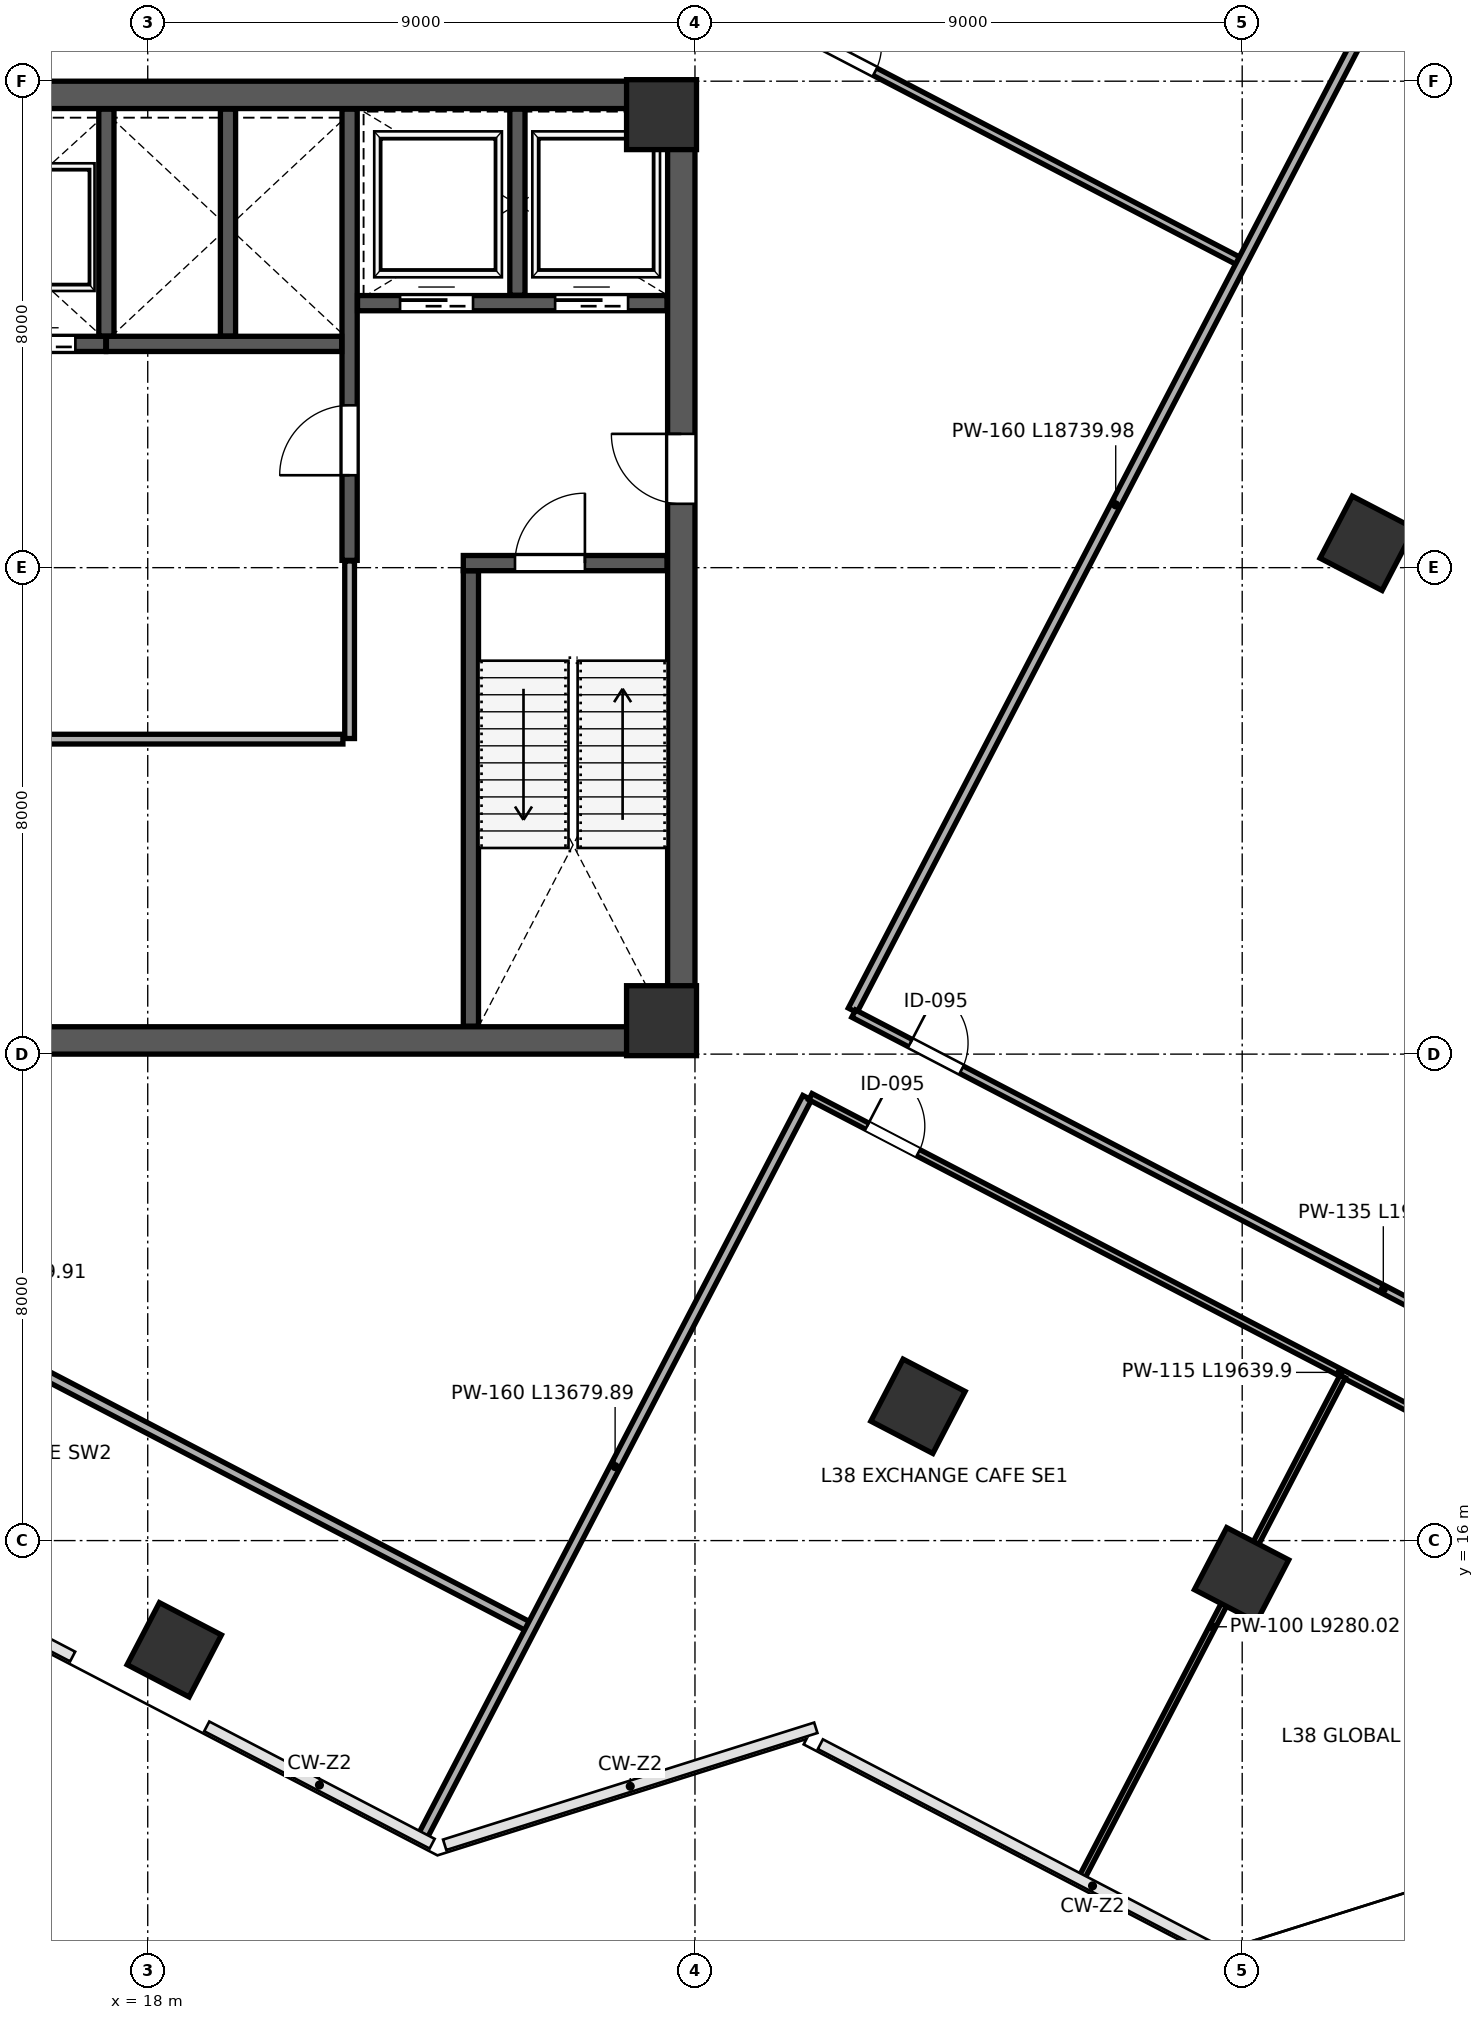
"""IFC4 building model, lengths in metres.
Left out: names, types, materials, properties, quantities, classifications, styles, units other than length and angle.
Written with IfcOpenShell. Run it as: python <this file> out.ifc"""

import sys

from ifc_helpers import new_model, si_unit, direction, frame, frame_2d, origin, origin_2d, place, context, subcontext, project, spatial, rectangle, extrude, clip, halfspace, source, transform, mapped, element, fill, save


model = new_model("IFC4")
c1 = context("Model", 3, precision=1e-05, world=origin(), true_north=direction((0.0, 1.0)))
c2 = subcontext(c1, "Body", "Model", "MODEL_VIEW")
j1 = project(units=[si_unit("LENGTHUNIT", "METRE"), si_unit("PLANEANGLEUNIT", "RADIAN")], contexts=[c1])
p1 = place(None, origin())
s1 = spatial("IfcSite", under=j1, at=p1, CompositionType="ELEMENT")
p2 = place(p1, origin())
s2 = spatial("IfcBuilding", under=s1, at=p2, CompositionType="ELEMENT")
p3 = place(p2, frame((0.0, 0.0, 170.8)))
s3 = spatial("IfcBuildingStorey", under=s2, at=p3, CompositionType="ELEMENT", Elevation=170.8)
m1 = source(origin(), c2, "Body", "SweptSolid", [
    extrude(rectangle(XDim=1.15, YDim=1.15, at=origin_2d()), origin(), (0.0, 0.0, 1.0), 4.198),
])
for number, where, z_axis, x_axis in (
    (1, (26.45, 24.55, 0.001), (0.0, 0.0, 1.0), (1.0, 0.0, 0.0)),
    (2, (26.45, 39.45, 0.001), (0.0, 0.0, 1.0), (1.0, 0.0, 0.0)),
):
    element("IfcColumn", number, at=place(p3, frame(where, z_axis=z_axis, x_axis=x_axis)), inside=s3, PredefinedType="COLUMN", context=c2, shape_type="MappedRepresentation", body=[
        mapped(m1, transform((0.0, 0.0, 0.0), scale=1.0)),
    ])
p4 = place(p3, frame((18.437, 14.204, 0.0), z_axis=(-0.091848266599, 0.016841742647, 0.995630579898), x_axis=(0.612171305094, 0.789548693959, 0.043117897532)))
e3 = element("IfcColumn", 3, at=p4, inside=s3, PredefinedType="COLUMN", context=c2, shape_type="Clipping", body=[
    clip(clip(extrude(rectangle(XDim=1.15, YDim=1.15, at=origin_2d()), origin(), (0.0, 0.0, 1.0), 4.218), halfspace(frame((0.0, 0.0, 0.073), z_axis=(0.0, 0.0, -1.0), x_axis=(1.0, 0.0, 0.0)), False)), halfspace(frame((0.0, 0.0, 4.145), z_axis=(0.0, 0.0, 1.0), x_axis=(1.0, 0.0, 0.0)), False)),
])
p5 = place(p3, frame((30.668, 18.208, 0.0), z_axis=(-0.071930787685, -0.046679722121, 0.996316699311), x_axis=(-0.096954290528, 0.99450093611, 0.039594868666)))
e4 = element("IfcColumn", 4, at=p5, inside=s3, PredefinedType="COLUMN", context=c2, shape_type="Clipping", body=[
    clip(clip(extrude(rectangle(XDim=1.15, YDim=1.15, at=origin_2d()), origin(), (0.0, 0.0, 1.0), 4.216), halfspace(frame((0.0, 0.0, 0.067), z_axis=(0.0, 0.0, -1.0), x_axis=(1.0, 0.0, 0.0)), False)), halfspace(frame((0.0, 0.0, 4.148), z_axis=(0.0, 0.0, 1.0), x_axis=(1.0, 0.0, 0.0)), False)),
])
p6 = place(p3, frame((38.056, 32.401, 0.0), z_axis=(0.001100398588, -0.085657342736, 0.996324048068), x_axis=(-0.892847218174, 0.44861923, 0.039555422793)))
e5 = element("IfcColumn", 5, at=p6, inside=s3, PredefinedType="COLUMN", context=c2, shape_type="Clipping", body=[
    clip(clip(extrude(rectangle(XDim=1.15, YDim=1.15, at=origin_2d()), origin(), (0.0, 0.0, 1.0), 4.215), halfspace(frame((0.0, 0.0, 0.067), z_axis=(0.0, 0.0, -1.0), x_axis=(1.0, 0.0, 0.0)), False)), halfspace(frame((0.0, 0.0, 4.148), z_axis=(0.0, 0.0, 1.0), x_axis=(1.0, 0.0, 0.0)), False)),
])
p7 = place(p3, frame((35.99, 15.438, 0.0), z_axis=(-0.086283669312, -0.073808921942, 0.993532773215), x_axis=(-0.227975249338, 0.972254300779, 0.052429574719)))
e6 = element("IfcColumn", 6, at=p7, inside=s3, PredefinedType="COLUMN", context=c2, shape_type="Clipping", body=[
    clip(clip(extrude(rectangle(XDim=1.15, YDim=1.15, at=origin_2d()), origin(), (0.0, 0.0, 1.0), 4.227), halfspace(frame((0.0, 0.0, 0.089), z_axis=(0.0, 0.0, -1.0), x_axis=(1.0, 0.0, 0.0)), False)), halfspace(frame((0.0, 0.0, 4.138), z_axis=(0.0, 0.0, 1.0), x_axis=(1.0, 0.0, 0.0)), False)),
])
p8 = place(p3, frame((26.775, 24.45, 0.0), z_axis=(0.0, 0.0, 1.0), x_axis=(0.0, 1.0, 0.0)))
e7 = element("IfcWall", 7, at=p8, inside=s3, PredefinedType="SHEAR", context=c2, shape_type="SweptSolid", body=[
    extrude(rectangle(XDim=15.1, YDim=0.45, at=frame_2d((7.55, 0.0))), origin(), (0.0, 0.0, 1.0), 3.96),
])
p9 = place(p8, frame((8.6, 0.0, 0.0)))
e8 = element("IfcOpeningElement", 8, at=p9, cuts=e7, PredefinedType="OPENING", context=c2, shape_type="SweptSolid", body=[
    extrude(rectangle(XDim=1.15, YDim=2.2, at=frame_2d((0.575, 1.1))), frame((0.0, 0.235, 0.0), z_axis=(0.0, -1.0, 0.0), x_axis=(1.0, 0.0, 0.0)), (0.0, 0.0, 1.0), 0.47),
])
for number, where, z_axis, x_axis in (
    (9, (9.0, 24.225, 0.0), (0.0, 0.0, 1.0), (1.0, 0.0, 0.0)),
    (10, (9.0, 39.775, 0.0), (0.0, 0.0, 1.0), (1.0, 0.0, 0.0)),
):
    element("IfcWall", number, at=place(p3, frame(where, z_axis=z_axis, x_axis=x_axis)), inside=s3, PredefinedType="SHEAR", context=c2, shape_type="SweptSolid", body=[
        extrude(rectangle(XDim=18.0, YDim=0.45, at=frame_2d((9.0, 0.0))), origin(), (0.0, 0.0, 1.0), 3.96),
    ])
p10 = place(p3, frame((23.315, 24.46, 0.0), z_axis=(0.0, 0.0, 1.0), x_axis=(0.0, 1.0, 0.0)))
e11 = element("IfcWall", 11, at=p10, inside=s3, PredefinedType="SHEAR", context=c2, shape_type="SweptSolid", body=[
    extrude(rectangle(XDim=7.49, YDim=0.25, at=frame_2d((3.745, 0.0))), origin(), (0.0, 0.0, 1.0), 3.96),
])
p11 = place(p3, frame((23.19, 32.075, 0.0), z_axis=(0.0, 0.0, 1.0), x_axis=(1.0, 0.0, 0.0)))
e12 = element("IfcWall", 12, at=p11, inside=s3, PredefinedType="SHEAR", context=c2, shape_type="SweptSolid", body=[
    extrude(rectangle(XDim=3.35, YDim=0.25, at=frame_2d((1.675, 0.0))), origin(), (0.0, 0.0, 1.0), 3.96),
])
p12 = place(p11, frame((0.85, 0.0, 0.0)))
e13 = element("IfcOpeningElement", 13, at=p12, cuts=e12, PredefinedType="OPENING", context=c2, shape_type="SweptSolid", body=[
    extrude(rectangle(XDim=1.15, YDim=2.2, at=frame_2d((0.575, 1.1))), frame((0.0, 0.135, 0.0), z_axis=(0.0, -1.0, 0.0), x_axis=(1.0, 0.0, 0.0)), (0.0, 0.0, 1.0), 0.27),
])
p13 = place(p3, frame((21.32, 32.12, 0.0), z_axis=(0.0, 0.0, 1.0), x_axis=(0.0, 1.0, 0.0)))
e14 = element("IfcWall", 14, at=p13, inside=s3, PredefinedType="SHEAR", context=c2, shape_type="SweptSolid", body=[
    extrude(rectangle(XDim=7.42, YDim=0.25, at=frame_2d((3.71, 0.0))), origin(), (0.0, 0.0, 1.0), 3.96),
])
p14 = place(p13, frame((1.4, 0.0, 0.0)))
e15 = element("IfcOpeningElement", 15, at=p14, cuts=e14, PredefinedType="OPENING", context=c2, shape_type="SweptSolid", body=[
    extrude(rectangle(XDim=1.15, YDim=2.2, at=frame_2d((0.575, 1.1))), frame((0.0, 0.135, 0.0), z_axis=(0.0, -1.0, 0.0), x_axis=(1.0, 0.0, 0.0)), (0.0, 0.0, 1.0), 0.27),
])
p15 = place(p3, frame((21.45, 36.35, 0.0), z_axis=(0.0, 0.0, 1.0), x_axis=(1.0, 0.0, 0.0)))
e16 = element("IfcWall", 16, at=p15, inside=s3, PredefinedType="SHEAR", context=c2, shape_type="SweptSolid", body=[
    extrude(rectangle(XDim=5.09, YDim=0.25, at=frame_2d((2.545, 0.0))), origin(), (0.0, 0.0, 1.0), 3.96),
])
p16 = place(p15, frame((0.7, 0.0, 0.0)))
e17 = element("IfcOpeningElement", 17, at=p16, cuts=e16, PredefinedType="OPENING", context=c2, shape_type="SweptSolid", body=[
    extrude(rectangle(XDim=1.2, YDim=2.2, at=frame_2d((0.6, 1.1))), frame((0.0, 0.135, 0.0), z_axis=(0.0, -1.0, 0.0), x_axis=(1.0, 0.0, 0.0)), (0.0, 0.0, 1.0), 0.27),
])
p17 = place(p15, frame((3.25, 0.0, 0.0)))
e18 = element("IfcOpeningElement", 18, at=p17, cuts=e16, PredefinedType="OPENING", context=c2, shape_type="SweptSolid", body=[
    extrude(rectangle(XDim=1.2, YDim=2.2, at=frame_2d((0.6, 1.1))), frame((0.0, 0.135, 0.0), z_axis=(0.0, -1.0, 0.0), x_axis=(1.0, 0.0, 0.0)), (0.0, 0.0, 1.0), 0.27),
])
p18 = place(p3, frame((24.08, 36.48, 0.0), z_axis=(0.0, 0.0, 1.0), x_axis=(0.0, 1.0, 0.0)))
e19 = element("IfcWall", 19, at=p18, inside=s3, PredefinedType="SHEAR", context=c2, shape_type="SweptSolid", body=[
    extrude(rectangle(XDim=3.06, YDim=0.25, at=frame_2d((1.53, 0.0))), origin(), (0.0, 0.0, 1.0), 3.96),
])
p19 = place(p3, frame((13.06, 35.68, 0.0), z_axis=(0.0, 0.0, 1.0), x_axis=(1.0, 0.0, 0.0)))
e20 = element("IfcWall", 20, at=p19, inside=s3, PredefinedType="SHEAR", context=c2, shape_type="SweptSolid", body=[
    extrude(rectangle(XDim=4.25, YDim=0.25, at=frame_2d((2.125, 0.0))), origin(), (0.0, 0.0, 1.0), 3.96),
])
p20 = place(p19, frame((0.65, 0.0, 0.0)))
e21 = element("IfcOpeningElement", 21, at=p20, cuts=e20, PredefinedType="OPENING", context=c2, shape_type="SweptSolid", body=[
    extrude(rectangle(XDim=1.1, YDim=2.2, at=frame_2d((0.55, 1.1))), frame((0.0, 0.135, 0.0), z_axis=(0.0, -1.0, 0.0), x_axis=(1.0, 0.0, 0.0)), (0.0, 0.0, 1.0), 0.27),
])
p21 = place(p19, frame((2.65, 0.0, 0.0)))
e22 = element("IfcOpeningElement", 22, at=p21, cuts=e20, PredefinedType="OPENING", context=c2, shape_type="SweptSolid", body=[
    extrude(rectangle(XDim=1.1, YDim=2.2, at=frame_2d((0.55, 1.1))), frame((0.0, 0.135, 0.0), z_axis=(0.0, -1.0, 0.0), x_axis=(1.0, 0.0, 0.0)), (0.0, 0.0, 1.0), 0.27),
])
p22 = place(p3, frame((17.32, 35.68, 0.0), z_axis=(0.0, 0.0, 1.0), x_axis=(1.0, 0.0, 0.0)))
e23 = element("IfcWall", 23, at=p22, inside=s3, PredefinedType="SHEAR", context=c2, shape_type="SweptSolid", body=[
    extrude(rectangle(XDim=3.87, YDim=0.25, at=frame_2d((1.935, 0.0))), origin(), (0.0, 0.0, 1.0), 3.96),
])
for number, where, z_axis, x_axis in (
    (24, (17.32, 35.81, 0.0), (0.0, 0.0, 1.0), (0.0, 1.0, 0.0)),
    (25, (19.32, 35.81, 0.0), (0.0, 0.0, 1.0), (0.0, 1.0, 0.0)),
):
    element("IfcWall", number, at=place(p3, frame(where, z_axis=z_axis, x_axis=x_axis)), inside=s3, PredefinedType="SHEAR", context=c2, shape_type="SweptSolid", body=[
        extrude(rectangle(XDim=3.73, YDim=0.25, at=frame_2d((1.865, 0.0))), origin(), (0.0, 0.0, 1.0), 3.96),
    ])
p23 = place(p3, frame((12.84, 29.18, 0.0), z_axis=(0.0, 0.0, 1.0), x_axis=(1.0, 0.0, 0.0)))
e26 = element("IfcWall", 26, at=p23, inside=s3, PredefinedType="PARTITIONING", context=c2, shape_type="SweptSolid", body=[
    extrude(rectangle(XDim=8.37, YDim=0.16, at=frame_2d((4.185, 0.0))), origin(), (0.0, 0.0, 1.0), 3.96),
])
p24 = place(p23, frame((2.6, 0.0, 0.0)))
e27 = element("IfcOpeningElement", 27, at=p24, cuts=e26, PredefinedType="OPENING", context=c2, shape_type="SweptSolid", body=[
    extrude(rectangle(XDim=0.9, YDim=2.15, at=frame_2d((0.45, 1.075))), frame((0.0, 0.09, 0.0), z_axis=(0.0, -1.0, 0.0), x_axis=(1.0, 0.0, 0.0)), (0.0, 0.0, 1.0), 0.18),
])
p25 = place(p3, frame((21.32, 29.19, 0.0), z_axis=(0.0, 0.0, 1.0), x_axis=(0.0, 1.0, 0.0)))
e28 = element("IfcWall", 28, at=p25, inside=s3, PredefinedType="PARTITIONING", context=c2, shape_type="SweptSolid", body=[
    extrude(rectangle(XDim=2.92, YDim=0.16, at=frame_2d((1.46, 0.0))), origin(), (0.0, 0.0, 1.0), 3.96),
])
p26 = place(p3, frame((6.699, 23.73, 0.0), z_axis=(0.0, 0.0, 1.0), x_axis=(0.887009683963, -0.46175082085, 0.0)))
e29 = element("IfcWall", 29, at=p26, inside=s3, PredefinedType="PARTITIONING", context=c2, shape_type="SweptSolid", body=[
    extrude(rectangle(XDim=19.81, YDim=0.16, at=frame_2d((9.905, 0.0))), origin(), (0.0, 0.0, 1.0), 3.96),
])
p27 = place(p26, frame((1.45, 0.0, 0.0)))
e30 = element("IfcOpeningElement", 30, at=p27, cuts=e29, PredefinedType="OPENING", context=c2, shape_type="SweptSolid", body=[
    extrude(rectangle(XDim=0.95, YDim=2.15, at=frame_2d((0.475, 1.075))), frame((0.0, 0.09, 0.0), z_axis=(0.0, -1.0, 0.0), x_axis=(1.0, 0.0, 0.0)), (0.0, 0.0, 1.0), 0.18),
])
p28 = place(p3, frame((11.104, 49.971, 0.0), z_axis=(0.0, 0.0, 1.0), x_axis=(0.887010001249, -0.461750211353, 0.0)))
e31 = element("IfcWall", 31, at=p28, inside=s3, PredefinedType="PARTITIONING", context=c2, shape_type="SweptSolid", body=[
    extrude(rectangle(XDim=28.02, YDim=0.135, at=frame_2d((14.01, 0.0))), origin(), (0.0, 0.0, 1.0), 3.96),
])
p29 = place(p28, frame((20.31, 0.0, 0.0)))
e32 = element("IfcOpeningElement", 32, at=p29, cuts=e31, PredefinedType="OPENING", context=c2, shape_type="SweptSolid", body=[
    extrude(rectangle(XDim=0.95, YDim=2.15, at=frame_2d((0.475, 1.075))), frame((0.0, 0.078, 0.0), z_axis=(0.0, -1.0, 0.0), x_axis=(1.0, 0.0, 0.0)), (0.0, 0.0, 1.0), 0.155),
])
p30 = place(p3, frame((29.593, 24.72, 0.0), z_axis=(0.0, 0.0, 1.0), x_axis=(0.461745249096, 0.88701258443, 0.0)))
e33 = element("IfcWall", 33, at=p30, inside=s3, PredefinedType="PARTITIONING", context=c2, shape_type="SweptSolid", body=[
    extrude(rectangle(XDim=18.74, YDim=0.16, at=frame_2d((9.37, 0.0))), origin(), (0.0, 0.0, 1.0), 3.195),
])
p31 = place(p3, frame((22.528, 11.149, 0.0), z_axis=(0.0, 0.0, 1.0), x_axis=(0.461766825398, 0.887001352289, 0.0)))
e34 = element("IfcWall", 34, at=p31, inside=s3, PredefinedType="PARTITIONING", context=c2, shape_type="SweptSolid", body=[
    extrude(rectangle(XDim=13.68, YDim=0.16, at=frame_2d((6.84, 0.0))), origin(), (0.0, 0.0, 1.0), 3.96),
])
p32 = place(p3, frame((29.61, 24.667, 0.0), z_axis=(0.0, 0.0, 1.0), x_axis=(0.887013798673, -0.461742916527, 0.0)))
e35 = element("IfcWall", 35, at=p32, inside=s3, PredefinedType="PARTITIONING", context=c2, shape_type="SweptSolid", body=[
    extrude(rectangle(XDim=19.64, YDim=0.135, at=frame_2d((9.82, 0.0))), origin(), (0.0, 0.0, 1.0), 3.252),
])
p33 = place(p32, frame((1.05, 0.0, 0.0)))
e36 = element("IfcOpeningElement", 36, at=p33, cuts=e35, PredefinedType="OPENING", context=c2, shape_type="SweptSolid", body=[
    extrude(rectangle(XDim=0.95, YDim=2.15, at=frame_2d((0.475, 1.075))), frame((0.0, 0.078, 0.0), z_axis=(0.0, -1.0, 0.0), x_axis=(1.0, 0.0, 0.0)), (0.0, 0.0, 1.0), 0.155),
])
p34 = place(p3, frame((28.899, 23.301, 0.0), z_axis=(0.0, 0.0, 1.0), x_axis=(0.887006056854, -0.461757788353, 0.0)))
e37 = element("IfcWall", 37, at=p34, inside=s3, PredefinedType="PARTITIONING", context=c2, shape_type="SweptSolid", body=[
    extrude(rectangle(XDim=19.64, YDim=0.115, at=frame_2d((9.82, 0.0))), origin(), (0.0, 0.0, 1.0), 3.252),
])
p35 = place(p34, frame((1.05, 0.0, 0.0)))
e38 = element("IfcOpeningElement", 38, at=p35, cuts=e37, PredefinedType="OPENING", context=c2, shape_type="SweptSolid", body=[
    extrude(rectangle(XDim=0.95, YDim=2.15, at=frame_2d((0.475, 1.075))), frame((0.0, 0.067, 0.0), z_axis=(0.0, -1.0, 0.0), x_axis=(1.0, 0.0, 0.0)), (0.0, 0.0, 1.0), 0.135),
])
p36 = place(p34, frame((11.38, 0.0, 0.0)))
e39 = element("IfcOpeningElement", 39, at=p36, cuts=e37, PredefinedType="OPENING", context=c2, shape_type="SweptSolid", body=[
    extrude(rectangle(XDim=0.95, YDim=2.15, at=frame_2d((0.475, 1.075))), frame((0.0, 0.067, 0.0), z_axis=(0.0, -1.0, 0.0), x_axis=(1.0, 0.0, 0.0)), (0.0, 0.0, 1.0), 0.135),
])
p37 = place(p3, frame((33.368, 10.467, 0.0), z_axis=(0.0, 0.0, 1.0), x_axis=(0.461728758034, 0.887021168859, 0.0)))
e40 = element("IfcWall", 40, at=p37, inside=s3, PredefinedType="PARTITIONING", context=c2, shape_type="SweptSolid", body=[
    extrude(rectangle(XDim=9.28, YDim=0.1, at=frame_2d((4.64, 0.0))), origin(), (0.0, 0.0, 1.0), 3.96),
])
m2 = source(origin(), c2, "Body", "SweptSolid", [
    extrude(rectangle(XDim=1.15, YDim=2.2, at=frame_2d((0.575, 1.1))), frame((0.0, 0.025, 0.0), z_axis=(0.0, -1.0, 0.0), x_axis=(1.0, 0.0, 0.0)), (0.0, 0.0, 1.0), 0.05),
])
p38 = place(p14, origin())
e41 = element("IfcDoor", 41, at=p38, inside=s3, OperationType="SINGLE_SWING_LEFT", PredefinedType="DOOR", context=c2, shape_type="MappedRepresentation", body=[
    mapped(m2, transform((0.0, 0.0, 0.0), scale=1.0)),
])
fill(e15, e41)
m3 = source(origin(), c2, "Body", "SweptSolid", [
    extrude(rectangle(XDim=1.15, YDim=2.2, at=frame_2d((0.575, 1.1))), frame((0.0, 0.025, 0.0), z_axis=(0.0, -1.0, 0.0), x_axis=(1.0, 0.0, 0.0)), (0.0, 0.0, 1.0), 0.05),
])
p39 = place(p12, origin())
e42 = element("IfcDoor", 42, at=p39, inside=s3, OperationType="SINGLE_SWING_RIGHT", PredefinedType="DOOR", context=c2, shape_type="MappedRepresentation", body=[
    mapped(m3, transform((0.0, 0.0, 0.0), scale=1.0)),
])
fill(e13, e42)
p40 = place(p9, origin())
e43 = element("IfcDoor", 43, at=p40, inside=s3, OperationType="SINGLE_SWING_RIGHT", PredefinedType="DOOR", context=c2, shape_type="MappedRepresentation", body=[
    mapped(m2, transform((0.0, 0.0, 0.0), scale=1.0)),
])
fill(e8, e43)
m4 = source(origin(), c2, "Body", "SweptSolid", [
    extrude(rectangle(XDim=1.1, YDim=2.2, at=frame_2d((0.55, 1.1))), frame((0.0, 0.025, 0.0), z_axis=(0.0, -1.0, 0.0), x_axis=(1.0, 0.0, 0.0)), (0.0, 0.0, 1.0), 0.05),
])
p41 = place(p21, origin())
e44 = element("IfcDoor", 44, at=p41, inside=s3, OperationType="SLIDING_TO_RIGHT", PredefinedType="DOOR", context=c2, shape_type="MappedRepresentation", body=[
    mapped(m4, transform((0.0, 0.0, 0.0), scale=1.0)),
])
fill(e22, e44)
m5 = source(origin(), c2, "Body", "SweptSolid", [
    extrude(rectangle(XDim=1.2, YDim=2.2, at=frame_2d((0.6, 1.1))), frame((0.0, 0.025, 0.0), z_axis=(0.0, -1.0, 0.0), x_axis=(1.0, 0.0, 0.0)), (0.0, 0.0, 1.0), 0.05),
])
p42 = place(p16, origin())
e45 = element("IfcDoor", 45, at=p42, inside=s3, OperationType="SLIDING_TO_LEFT", PredefinedType="DOOR", context=c2, shape_type="MappedRepresentation", body=[
    mapped(m5, transform((0.0, 0.0, 0.0), scale=1.0)),
])
fill(e17, e45)
p43 = place(p17, origin())
e46 = element("IfcDoor", 46, at=p43, inside=s3, OperationType="SLIDING_TO_RIGHT", PredefinedType="DOOR", context=c2, shape_type="MappedRepresentation", body=[
    mapped(m5, transform((0.0, 0.0, 0.0), scale=1.0)),
])
fill(e18, e46)
m6 = source(origin(), c2, "Body", "SweptSolid", [
    extrude(rectangle(XDim=0.95, YDim=2.15, at=frame_2d((0.475, 1.075))), frame((0.0, 0.025, 0.0), z_axis=(0.0, -1.0, 0.0), x_axis=(1.0, 0.0, 0.0)), (0.0, 0.0, 1.0), 0.05),
])
p44 = place(p29, origin())
e47 = element("IfcDoor", 47, at=p44, inside=s3, OperationType="SINGLE_SWING_LEFT", PredefinedType="DOOR", context=c2, shape_type="MappedRepresentation", body=[
    mapped(m6, transform((0.0, 0.0, 0.0), scale=1.0)),
])
fill(e32, e47)
p45 = place(p33, origin())
e48 = element("IfcDoor", 48, at=p45, inside=s3, OperationType="SINGLE_SWING_LEFT", PredefinedType="DOOR", context=c2, shape_type="MappedRepresentation", body=[
    mapped(m6, transform((0.0, 0.0, 0.0), scale=1.0)),
])
fill(e36, e48)
p46 = place(p35, origin())
e49 = element("IfcDoor", 49, at=p46, inside=s3, OperationType="SINGLE_SWING_LEFT", PredefinedType="DOOR", context=c2, shape_type="MappedRepresentation", body=[
    mapped(m6, transform((0.0, 0.0, 0.0), scale=1.0)),
])
fill(e38, e49)
save(model, sys.argv[1])
